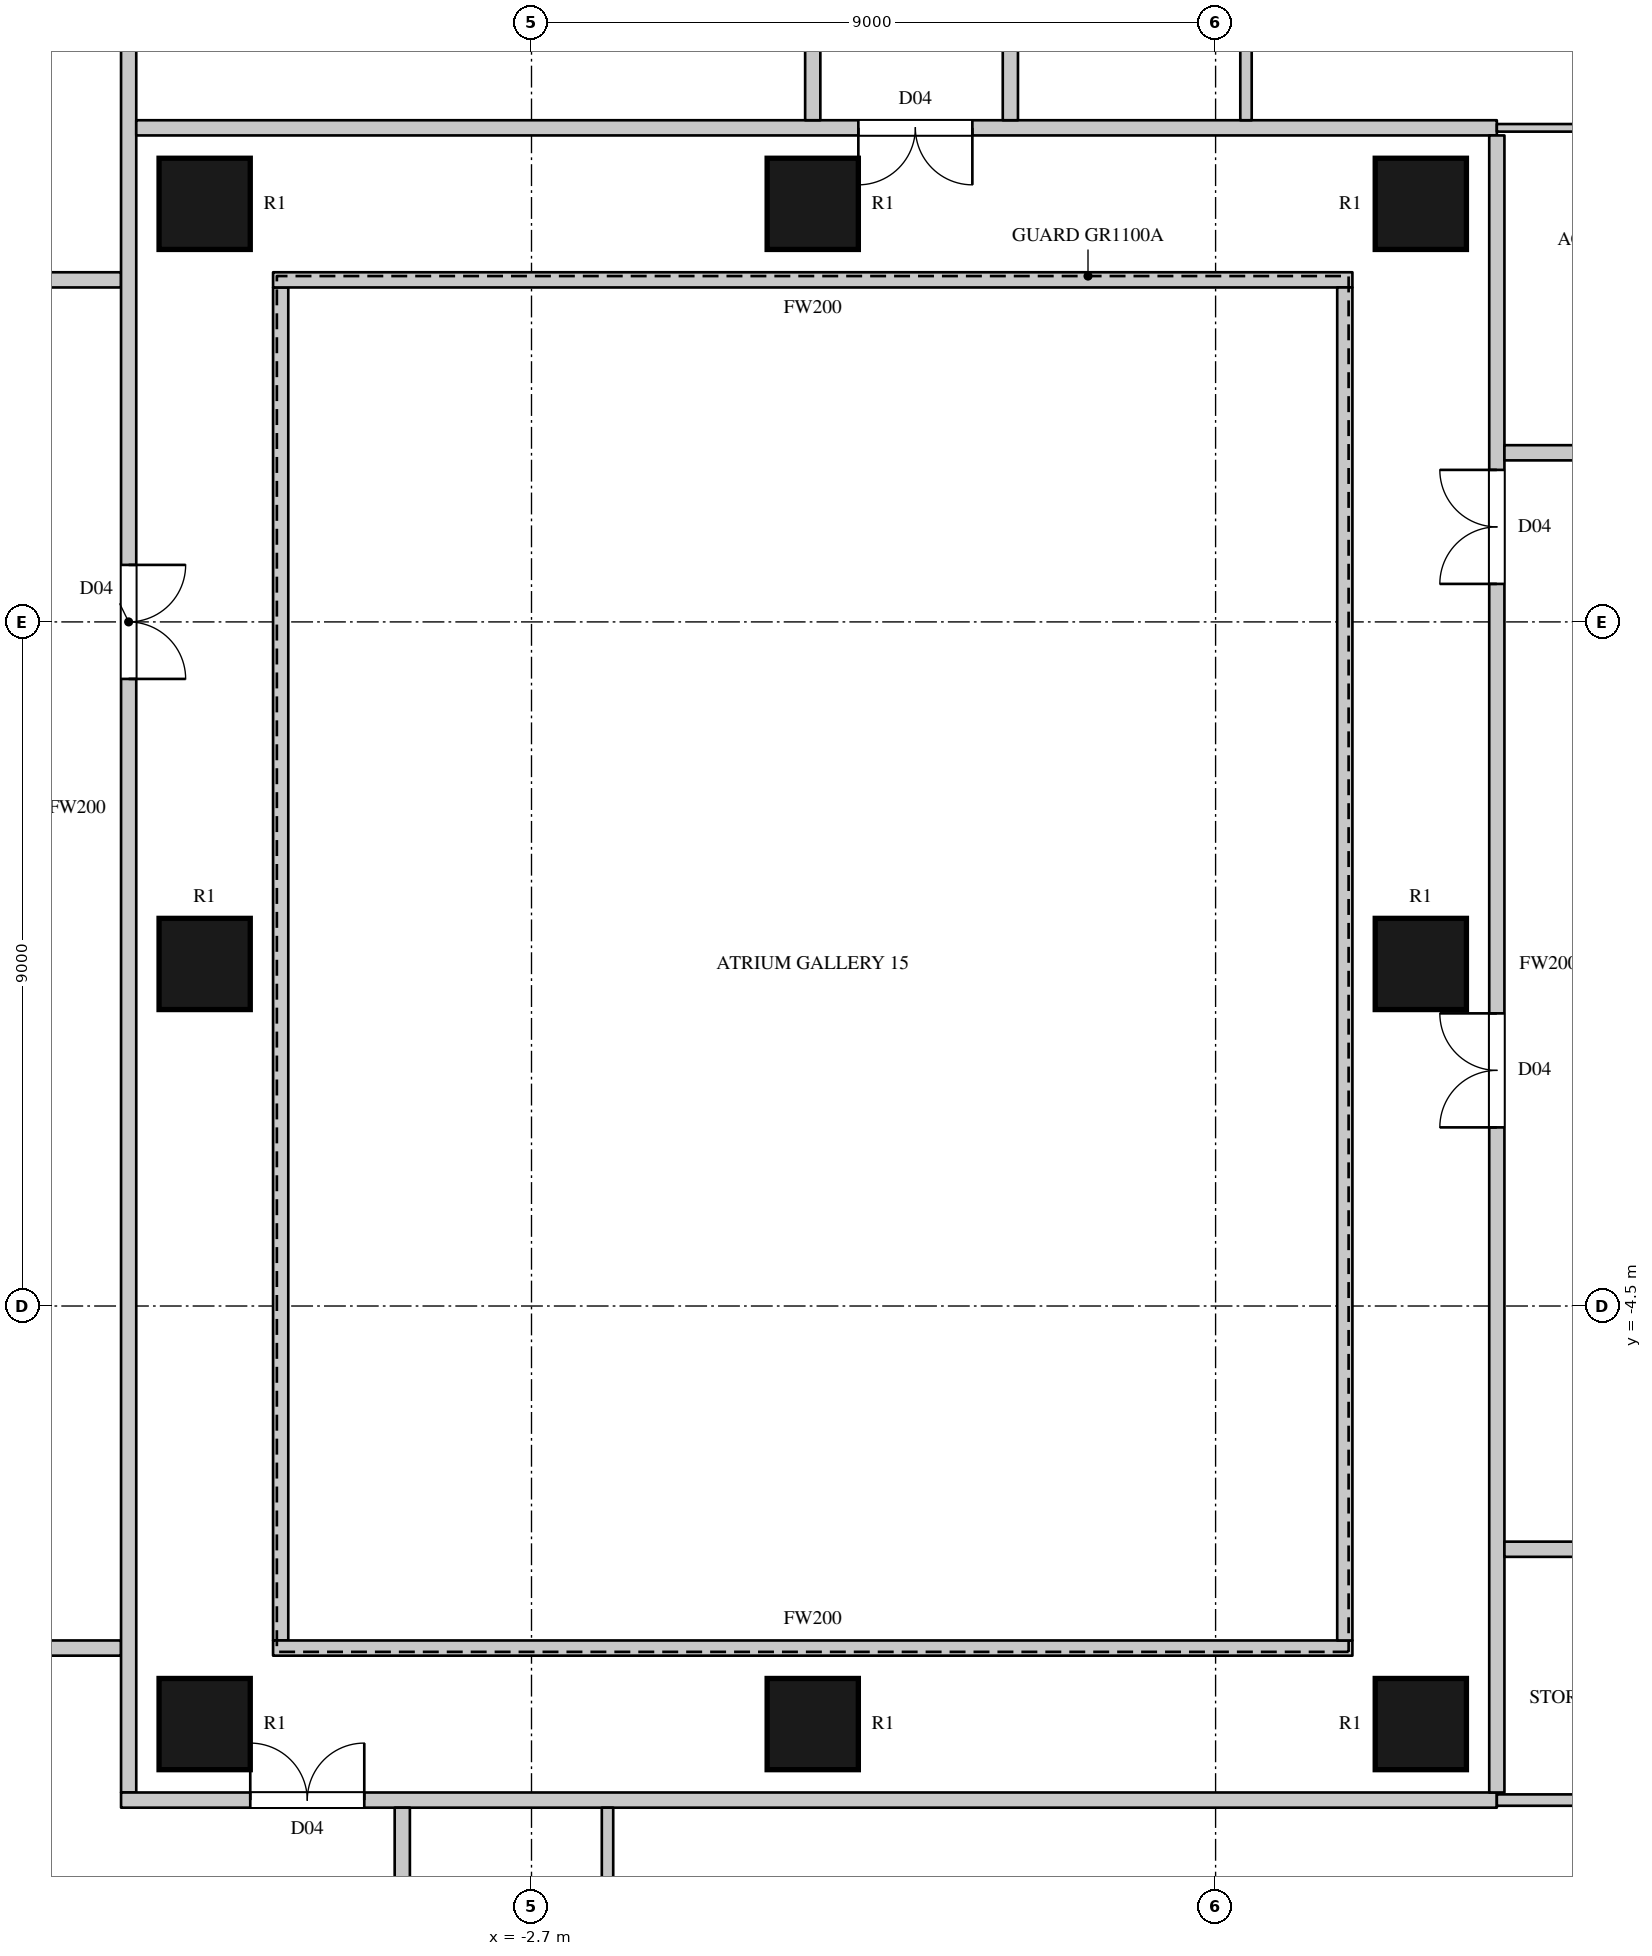
"""IFC4 building model, lengths in metres.
Left out: names, types, materials, properties, quantities, classifications, styles, units other than length and angle.
Written with IfcOpenShell. Run it as: python <this file> out.ifc"""

import sys

from ifc_helpers import new_model, si_unit, direction, frame, frame_2d, origin, origin_2d, place, context, subcontext, project, spatial, rectangle, circle, extrude, element, fill, save


model = new_model("IFC4")
c1 = context("Model", 3, precision=1e-05, world=origin(), true_north=direction((0.0, 1.0)))
c2 = subcontext(c1, "Body", "Model", "MODEL_VIEW")
j1 = project(units=[si_unit("LENGTHUNIT", "METRE"), si_unit("PLANEANGLEUNIT", "RADIAN")], contexts=[c1])
p1 = place(None, origin())
s1 = spatial("IfcSite", under=j1, at=p1, CompositionType="ELEMENT")
p2 = place(p1, origin())
s2 = spatial("IfcBuilding", under=s1, at=p2, CompositionType="ELEMENT")
p3 = place(p2, frame((0.0, 0.0, 84.3)))
s3 = spatial("IfcBuildingStorey", under=s2, at=p3, CompositionType="ELEMENT", Elevation=84.3)
for number, where, z_axis, x_axis in (
    (1, (-7.0, -10.0, 0.0), (0.0, 0.0, 1.0), (1.0, 0.0, 0.0)),
    (2, (-7.0, 0.0, 0.0), (0.0, 0.0, 1.0), (1.0, 0.0, 0.0)),
    (3, (-7.0, 10.0, 0.0), (0.0, 0.0, 1.0), (1.0, 0.0, 0.0)),
    (4, (1.0, -10.0, 0.0), (0.0, 0.0, 1.0), (1.0, 0.0, 0.0)),
    (5, (1.0, 10.0, 0.0), (0.0, 0.0, 1.0), (1.0, 0.0, 0.0)),
    (6, (9.0, -10.0, 0.0), (0.0, 0.0, 1.0), (1.0, 0.0, 0.0)),
    (7, (9.0, 0.0, 0.0), (0.0, 0.0, 1.0), (1.0, 0.0, 0.0)),
    (8, (9.0, 10.0, 0.0), (0.0, 0.0, 1.0), (1.0, 0.0, 0.0)),
):
    element("IfcColumn", number, at=place(p3, frame(where, z_axis=z_axis, x_axis=x_axis)), inside=s3, PredefinedType="COLUMN", context=c2, shape_type="SweptSolid", body=[
        extrude(circle(Radius=0.6, at=origin_2d()), origin(), (0.0, 0.0, 1.0), 3.6),
    ])
p4 = place(p3, frame((-13.97, -9.0, 0.0), z_axis=(0.0, 0.0, 1.0), x_axis=(1.0, 0.0, 0.0)))
e9 = element("IfcWall", 9, at=p4, inside=s3, PredefinedType="PARTITIONING", context=c2, shape_type="SweptSolid", body=[
    extrude(rectangle(XDim=5.87, YDim=0.2, at=frame_2d((2.935, 0.0))), origin(), (0.0, 0.0, 1.0), 3.3),
])
p5 = place(p4, frame((0.4, 0.0, 0.0)))
e10 = element("IfcOpeningElement", 10, at=p5, cuts=e9, PredefinedType="OPENING", context=c2, shape_type="SweptSolid", body=[
    extrude(rectangle(XDim=1.5, YDim=2.2, at=frame_2d((0.75, 1.1))), frame((0.0, 0.11, 0.0), z_axis=(0.0, -1.0, 0.0), x_axis=(1.0, 0.0, 0.0)), (0.0, 0.0, 1.0), 0.22),
])
p6 = place(p4, frame((2.05, 0.0, 0.0)))
e11 = element("IfcOpeningElement", 11, at=p6, cuts=e9, PredefinedType="OPENING", context=c2, shape_type="SweptSolid", body=[
    extrude(rectangle(XDim=1.5, YDim=2.2, at=frame_2d((0.75, 1.1))), frame((0.0, 0.11, 0.0), z_axis=(0.0, -1.0, 0.0), x_axis=(1.0, 0.0, 0.0)), (0.0, 0.0, 1.0), 0.22),
])
p7 = place(p3, frame((-13.97, 9.0, 0.0), z_axis=(0.0, 0.0, 1.0), x_axis=(1.0, 0.0, 0.0)))
e12 = element("IfcWall", 12, at=p7, inside=s3, PredefinedType="PARTITIONING", context=c2, shape_type="SweptSolid", body=[
    extrude(rectangle(XDim=5.87, YDim=0.2, at=frame_2d((2.935, 0.0))), origin(), (0.0, 0.0, 1.0), 3.3),
])
p8 = place(p3, frame((-8.0, -10.9, 0.0), z_axis=(0.0, 0.0, 1.0), x_axis=(0.0, 1.0, 0.0)))
e13 = element("IfcWall", 13, at=p8, inside=s3, PredefinedType="PARTITIONING", context=c2, shape_type="SweptSolid", body=[
    extrude(rectangle(XDim=25.9, YDim=0.2, at=frame_2d((12.95, 0.0))), origin(), (0.0, 0.0, 1.0), 3.3),
])
p9 = place(p8, frame((14.65, 0.0, 0.0)))
e14 = element("IfcOpeningElement", 14, at=p9, cuts=e13, PredefinedType="OPENING", context=c2, shape_type="SweptSolid", body=[
    extrude(rectangle(XDim=1.5, YDim=2.2, at=frame_2d((0.75, 1.1))), frame((0.0, 0.11, 0.0), z_axis=(0.0, -1.0, 0.0), x_axis=(1.0, 0.0, 0.0)), (0.0, 0.0, 1.0), 0.22),
])
p10 = place(p8, frame((24.15, 0.0, 0.0)))
e15 = element("IfcOpeningElement", 15, at=p10, cuts=e13, PredefinedType="OPENING", context=c2, shape_type="SweptSolid", body=[
    extrude(rectangle(XDim=1.6, YDim=2.4, at=frame_2d((0.8, 1.2))), frame((0.0, 0.11, 0.0), z_axis=(0.0, -1.0, 0.0), x_axis=(1.0, 0.0, 0.0)), (0.0, 0.0, 1.0), 0.22),
])
p11 = place(p3, frame((-8.1, -11.0, 0.0), z_axis=(0.0, 0.0, 1.0), x_axis=(1.0, 0.0, 0.0)))
e16 = element("IfcWall", 16, at=p11, inside=s3, PredefinedType="PARTITIONING", context=c2, shape_type="SweptSolid", body=[
    extrude(rectangle(XDim=18.1, YDim=0.2, at=frame_2d((9.05, 0.0))), origin(), (0.0, 0.0, 1.0), 3.3),
])
p12 = place(p11, frame((1.7, 0.0, 0.0)))
e17 = element("IfcOpeningElement", 17, at=p12, cuts=e16, PredefinedType="OPENING", context=c2, shape_type="SweptSolid", body=[
    extrude(rectangle(XDim=1.5, YDim=2.2, at=frame_2d((0.75, 1.1))), frame((0.0, 0.11, 0.0), z_axis=(0.0, -1.0, 0.0), x_axis=(1.0, 0.0, 0.0)), (0.0, 0.0, 1.0), 0.22),
])
p13 = place(p3, frame((-7.9, 11.0, 0.0), z_axis=(0.0, 0.0, 1.0), x_axis=(1.0, 0.0, 0.0)))
e18 = element("IfcWall", 18, at=p13, inside=s3, PredefinedType="PARTITIONING", context=c2, shape_type="SweptSolid", body=[
    extrude(rectangle(XDim=17.9, YDim=0.2, at=frame_2d((8.95, 0.0))), origin(), (0.0, 0.0, 1.0), 3.3),
])
p14 = place(p13, frame((9.5, 0.0, 0.0)))
e19 = element("IfcOpeningElement", 19, at=p14, cuts=e18, PredefinedType="OPENING", context=c2, shape_type="SweptSolid", body=[
    extrude(rectangle(XDim=1.5, YDim=2.2, at=frame_2d((0.75, 1.1))), frame((0.0, 0.11, 0.0), z_axis=(0.0, -1.0, 0.0), x_axis=(1.0, 0.0, 0.0)), (0.0, 0.0, 1.0), 0.22),
])
p15 = place(p3, frame((-6.0, -8.9, 0.0), z_axis=(0.0, 0.0, 1.0), x_axis=(0.0, 1.0, 0.0)))
e20 = element("IfcWall", 20, at=p15, inside=s3, PredefinedType="PARTITIONING", context=c2, shape_type="SweptSolid", body=[
    extrude(rectangle(XDim=17.8, YDim=0.2, at=frame_2d((8.9, 0.0))), origin(), (0.0, 0.0, 1.0), 3.3),
])
for number, where, z_axis, x_axis in (
    (21, (-6.1, -9.0, 0.0), (0.0, 0.0, 1.0), (1.0, 0.0, 0.0)),
    (22, (-6.1, 9.0, 0.0), (0.0, 0.0, 1.0), (1.0, 0.0, 0.0)),
):
    element("IfcWall", number, at=place(p3, frame(where, z_axis=z_axis, x_axis=x_axis)), inside=s3, PredefinedType="PARTITIONING", context=c2, shape_type="SweptSolid", body=[
        extrude(rectangle(XDim=14.2, YDim=0.2, at=frame_2d((7.1, 0.0))), origin(), (0.0, 0.0, 1.0), 3.3),
    ])
p16 = place(p3, frame((-4.4, -15.0, 0.0), z_axis=(0.0, 0.0, 1.0), x_axis=(0.0, 1.0, 0.0)))
e23 = element("IfcWall", 23, at=p16, inside=s3, PredefinedType="PARTITIONING", context=c2, shape_type="SweptSolid", body=[
    extrude(rectangle(XDim=3.9, YDim=0.2, at=frame_2d((1.95, 0.0))), origin(), (0.0, 0.0, 1.0), 3.3),
])
p17 = place(p16, frame((0.15, 0.0, 0.0)))
e24 = element("IfcOpeningElement", 24, at=p17, cuts=e23, PredefinedType="OPENING", context=c2, shape_type="SweptSolid", body=[
    extrude(rectangle(XDim=0.9, YDim=2.2, at=frame_2d((0.45, 1.1))), frame((0.0, 0.11, 0.0), z_axis=(0.0, -1.0, 0.0), x_axis=(1.0, 0.0, 0.0)), (0.0, 0.0, 1.0), 0.22),
])
p18 = place(p3, frame((1.0, 11.1, 0.0), z_axis=(0.0, 0.0, 1.0), x_axis=(0.0, 1.0, 0.0)))
e25 = element("IfcWall", 25, at=p18, inside=s3, PredefinedType="PARTITIONING", context=c2, shape_type="SweptSolid", body=[
    extrude(rectangle(XDim=3.9, YDim=0.2, at=frame_2d((1.95, 0.0))), origin(), (0.0, 0.0, 1.0), 3.3),
])
p19 = place(p3, frame((3.6, 11.1, 0.0), z_axis=(0.0, 0.0, 1.0), x_axis=(0.0, 1.0, 0.0)))
e26 = element("IfcWall", 26, at=p19, inside=s3, PredefinedType="PARTITIONING", context=c2, shape_type="SweptSolid", body=[
    extrude(rectangle(XDim=3.9, YDim=0.2, at=frame_2d((1.95, 0.0))), origin(), (0.0, 0.0, 1.0), 3.3),
])
p20 = place(p19, frame((2.8, 0.0, 0.0)))
e27 = element("IfcOpeningElement", 27, at=p20, cuts=e26, PredefinedType="OPENING", context=c2, shape_type="SweptSolid", body=[
    extrude(rectangle(XDim=0.95, YDim=2.2, at=frame_2d((0.475, 1.1))), frame((0.0, 0.11, 0.0), z_axis=(0.0, -1.0, 0.0), x_axis=(1.0, 0.0, 0.0)), (0.0, 0.0, 1.0), 0.22),
])
p21 = place(p3, frame((8.0, -8.9, 0.0), z_axis=(0.0, 0.0, 1.0), x_axis=(0.0, 1.0, 0.0)))
e28 = element("IfcWall", 28, at=p21, inside=s3, PredefinedType="PARTITIONING", context=c2, shape_type="SweptSolid", body=[
    extrude(rectangle(XDim=17.8, YDim=0.2, at=frame_2d((8.9, 0.0))), origin(), (0.0, 0.0, 1.0), 3.3),
])
p22 = place(p3, frame((10.0, -10.9, 0.0), z_axis=(0.0, 0.0, 1.0), x_axis=(0.0, 1.0, 0.0)))
e29 = element("IfcWall", 29, at=p22, inside=s3, PredefinedType="PARTITIONING", context=c2, shape_type="SweptSolid", body=[
    extrude(rectangle(XDim=21.8, YDim=0.2, at=frame_2d((10.9, 0.0))), origin(), (0.0, 0.0, 1.0), 3.3),
])
p23 = place(p22, frame((15.9, 0.0, 0.0)))
e30 = element("IfcOpeningElement", 30, at=p23, cuts=e29, PredefinedType="OPENING", context=c2, shape_type="SweptSolid", body=[
    extrude(rectangle(XDim=1.5, YDim=2.2, at=frame_2d((0.75, 1.1))), frame((0.0, 0.11, 0.0), z_axis=(0.0, -1.0, 0.0), x_axis=(1.0, 0.0, 0.0)), (0.0, 0.0, 1.0), 0.22),
])
p24 = place(p22, frame((8.75, 0.0, 0.0)))
e31 = element("IfcOpeningElement", 31, at=p24, cuts=e29, PredefinedType="OPENING", context=c2, shape_type="SweptSolid", body=[
    extrude(rectangle(XDim=1.5, YDim=2.2, at=frame_2d((0.75, 1.1))), frame((0.0, 0.11, 0.0), z_axis=(0.0, -1.0, 0.0), x_axis=(1.0, 0.0, 0.0)), (0.0, 0.0, 1.0), 0.22),
])
p25 = place(p3, frame((10.1, -7.7, 0.0), z_axis=(0.0, 0.0, 1.0), x_axis=(1.0, 0.0, 0.0)))
e32 = element("IfcWall", 32, at=p25, inside=s3, PredefinedType="PARTITIONING", context=c2, shape_type="SweptSolid", body=[
    extrude(rectangle(XDim=3.7, YDim=0.2, at=frame_2d((1.85, 0.0))), origin(), (0.0, 0.0, 1.0), 3.3),
])
p26 = place(p25, frame((2.45, 0.0, 0.0)))
e33 = element("IfcOpeningElement", 33, at=p26, cuts=e32, PredefinedType="OPENING", context=c2, shape_type="SweptSolid", body=[
    extrude(rectangle(XDim=0.9, YDim=2.2, at=frame_2d((0.45, 1.1))), frame((0.0, 0.11, 0.0), z_axis=(0.0, -1.0, 0.0), x_axis=(1.0, 0.0, 0.0)), (0.0, 0.0, 1.0), 0.22),
])
p27 = place(p3, frame((10.1, 6.725, 0.0), z_axis=(0.0, 0.0, 1.0), x_axis=(1.0, 0.0, 0.0)))
e34 = element("IfcWall", 34, at=p27, inside=s3, PredefinedType="PARTITIONING", context=c2, shape_type="SweptSolid", body=[
    extrude(rectangle(XDim=3.7, YDim=0.2, at=frame_2d((1.85, 0.0))), origin(), (0.0, 0.0, 1.0), 3.3),
])
p28 = place(p27, frame((2.45, 0.0, 0.0)))
e35 = element("IfcOpeningElement", 35, at=p28, cuts=e34, PredefinedType="OPENING", context=c2, shape_type="SweptSolid", body=[
    extrude(rectangle(XDim=0.9, YDim=2.2, at=frame_2d((0.45, 1.1))), frame((0.0, 0.11, 0.0), z_axis=(0.0, -1.0, 0.0), x_axis=(1.0, 0.0, 0.0)), (0.0, 0.0, 1.0), 0.22),
])
for number, where, z_axis, x_axis in (
    (36, (-1.7, -15.0, 0.0), (0.0, 0.0, 1.0), (0.0, 1.0, 0.0)),
    (37, (6.7, 11.1, 0.0), (0.0, 0.0, 1.0), (0.0, 1.0, 0.0)),
):
    element("IfcWall", number, at=place(p3, frame(where, z_axis=z_axis, x_axis=x_axis)), inside=s3, PredefinedType="PARTITIONING", context=c2, shape_type="SweptSolid", body=[
        extrude(rectangle(XDim=3.9, YDim=0.15, at=frame_2d((1.95, 0.0))), origin(), (0.0, 0.0, 1.0), 3.3),
    ])
p29 = place(p3, frame((10.0, -11.0, 0.0), z_axis=(0.0, 0.0, 1.0), x_axis=(1.0, 0.0, 0.0)))
e38 = element("IfcWall", 38, at=p29, inside=s3, PredefinedType="PARTITIONING", context=c2, shape_type="SweptSolid", body=[
    extrude(rectangle(XDim=3.6, YDim=0.15, at=frame_2d((1.8, 0.0))), origin(), (0.0, 0.0, 1.0), 3.3),
])
p30 = place(p3, frame((10.0, 11.0, 0.0), z_axis=(0.0, 0.0, 1.0), x_axis=(1.0, 0.0, 0.0)))
e39 = element("IfcWall", 39, at=p30, inside=s3, PredefinedType="PARTITIONING", context=c2, shape_type="SweptSolid", body=[
    extrude(rectangle(XDim=3.6, YDim=0.1, at=frame_2d((1.8, 0.0))), origin(), (0.0, 0.0, 1.0), 3.3),
])
p31 = place(p9, origin())
e40 = element("IfcDoor", 40, at=p31, inside=s3, OperationType="DOUBLE_DOOR_SINGLE_SWING", PredefinedType="DOOR", context=c2, shape_type="SweptSolid", body=[
    extrude(rectangle(XDim=1.5, YDim=2.2, at=frame_2d((0.75, 1.1))), frame((0.0, 0.025, 0.0), z_axis=(0.0, -1.0, 0.0), x_axis=(1.0, 0.0, 0.0)), (0.0, 0.0, 1.0), 0.05),
])
fill(e14, e40)
p32 = place(p12, origin())
e41 = element("IfcDoor", 41, at=p32, inside=s3, OperationType="DOUBLE_DOOR_SINGLE_SWING", PredefinedType="DOOR", context=c2, shape_type="SweptSolid", body=[
    extrude(rectangle(XDim=1.5, YDim=2.2, at=frame_2d((0.75, 1.1))), frame((0.0, 0.025, 0.0), z_axis=(0.0, -1.0, 0.0), x_axis=(1.0, 0.0, 0.0)), (0.0, 0.0, 1.0), 0.05),
])
fill(e17, e41)
p33 = place(p14, origin())
e42 = element("IfcDoor", 42, at=p33, inside=s3, OperationType="DOUBLE_DOOR_SINGLE_SWING", PredefinedType="DOOR", context=c2, shape_type="SweptSolid", body=[
    extrude(rectangle(XDim=1.5, YDim=2.2, at=frame_2d((0.75, 1.1))), frame((0.0, 0.025, 0.0), z_axis=(0.0, -1.0, 0.0), x_axis=(1.0, 0.0, 0.0)), (0.0, 0.0, 1.0), 0.05),
])
fill(e19, e42)
p34 = place(p23, origin())
e43 = element("IfcDoor", 43, at=p34, inside=s3, OperationType="DOUBLE_DOOR_SINGLE_SWING", PredefinedType="DOOR", context=c2, shape_type="SweptSolid", body=[
    extrude(rectangle(XDim=1.5, YDim=2.2, at=frame_2d((0.75, 1.1))), frame((0.0, 0.025, 0.0), z_axis=(0.0, -1.0, 0.0), x_axis=(1.0, 0.0, 0.0)), (0.0, 0.0, 1.0), 0.05),
])
fill(e30, e43)
p35 = place(p24, origin())
e44 = element("IfcDoor", 44, at=p35, inside=s3, OperationType="DOUBLE_DOOR_SINGLE_SWING", PredefinedType="DOOR", context=c2, shape_type="SweptSolid", body=[
    extrude(rectangle(XDim=1.5, YDim=2.2, at=frame_2d((0.75, 1.1))), frame((0.0, 0.025, 0.0), z_axis=(0.0, -1.0, 0.0), x_axis=(1.0, 0.0, 0.0)), (0.0, 0.0, 1.0), 0.05),
])
fill(e31, e44)
save(model, sys.argv[1])
